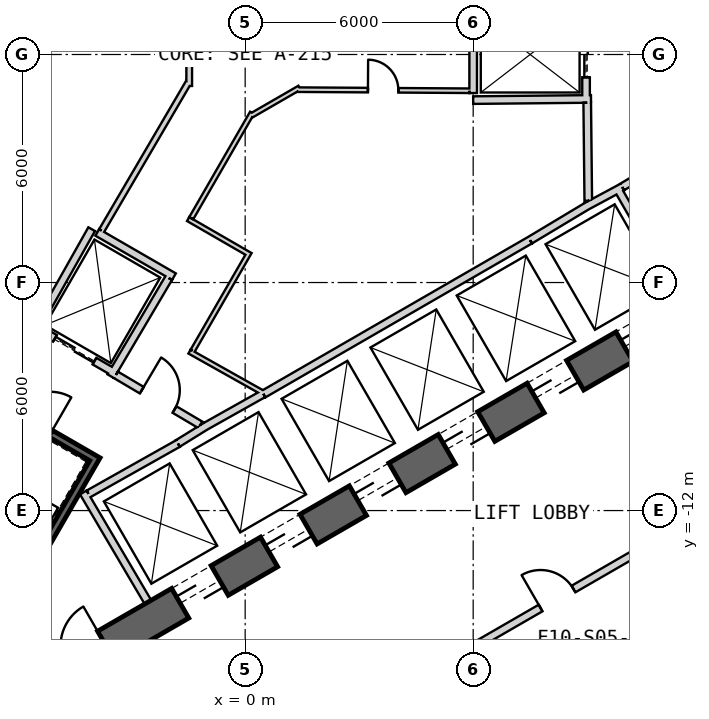
"""IFC4 building model, lengths in metres.
Left out: names, types, materials, properties, quantities, classifications, styles, units other than length and angle.
Written with IfcOpenShell. Run it as: python <this file> out.ifc"""

import sys

from ifc_helpers import new_model, si_unit, direction, frame, frame_2d, origin, place, context, subcontext, project, spatial, rectangle, extrude, element, fill, save


model = new_model("IFC4")
c1 = context("Model", 3, precision=1e-05, world=origin(), true_north=direction((0.0, 1.0)))
c2 = subcontext(c1, "Body", "Model", "MODEL_VIEW")
j1 = project(units=[si_unit("LENGTHUNIT", "METRE"), si_unit("PLANEANGLEUNIT", "RADIAN")], contexts=[c1])
p1 = place(None, origin())
s1 = spatial("IfcSite", under=j1, at=p1, CompositionType="ELEMENT")
p2 = place(p1, origin())
s2 = spatial("IfcBuilding", under=s1, at=p2, CompositionType="ELEMENT")
p3 = place(p2, frame((0.0, 0.0, 107.0)))
s3 = spatial("IfcBuildingStorey", under=s2, at=p3, CompositionType="ELEMENT", Elevation=107.0)
p4 = place(p3, frame((-7.825, -17.97, 0.0), z_axis=(0.0, 0.0, 1.0), x_axis=(0.866028369851, 0.499994862586, 0.0)))
e1 = element("IfcWall", 1, at=p4, inside=s3, PredefinedType="SHEAR", context=c2, shape_type="SweptSolid", body=[
    extrude(rectangle(XDim=31.523, YDim=0.9, at=frame_2d((15.762, 0.0))), origin(), (0.0, 0.0, 1.0), 4.1),
])
p5 = place(p4, frame((7.062, 0.0, 0.0)))
e2 = element("IfcOpeningElement", 2, at=p5, cuts=e1, PredefinedType="OPENING", context=c2, shape_type="SweptSolid", body=[
    extrude(rectangle(XDim=1.2, YDim=2.4, at=frame_2d((0.6, 1.2))), frame((0.0, 0.46, 0.0), z_axis=(0.0, -1.0, 0.0), x_axis=(1.0, 0.0, 0.0)), (0.0, 0.0, 1.0), 0.92),
])
p6 = place(p4, frame((9.762, 0.0, 0.0)))
e3 = element("IfcOpeningElement", 3, at=p6, cuts=e1, PredefinedType="OPENING", context=c2, shape_type="SweptSolid", body=[
    extrude(rectangle(XDim=1.2, YDim=2.4, at=frame_2d((0.6, 1.2))), frame((0.0, 0.46, 0.0), z_axis=(0.0, -1.0, 0.0), x_axis=(1.0, 0.0, 0.0)), (0.0, 0.0, 1.0), 0.92),
])
p7 = place(p4, frame((12.462, 0.0, 0.0)))
e4 = element("IfcOpeningElement", 4, at=p7, cuts=e1, PredefinedType="OPENING", context=c2, shape_type="SweptSolid", body=[
    extrude(rectangle(XDim=1.2, YDim=2.4, at=frame_2d((0.6, 1.2))), frame((0.0, 0.46, 0.0), z_axis=(0.0, -1.0, 0.0), x_axis=(1.0, 0.0, 0.0)), (0.0, 0.0, 1.0), 0.92),
])
p8 = place(p4, frame((15.162, 0.0, 0.0)))
e5 = element("IfcOpeningElement", 5, at=p8, cuts=e1, PredefinedType="OPENING", context=c2, shape_type="SweptSolid", body=[
    extrude(rectangle(XDim=1.2, YDim=2.4, at=frame_2d((0.6, 1.2))), frame((0.0, 0.46, 0.0), z_axis=(0.0, -1.0, 0.0), x_axis=(1.0, 0.0, 0.0)), (0.0, 0.0, 1.0), 0.92),
])
p9 = place(p4, frame((17.862, 0.0, 0.0)))
e6 = element("IfcOpeningElement", 6, at=p9, cuts=e1, PredefinedType="OPENING", context=c2, shape_type="SweptSolid", body=[
    extrude(rectangle(XDim=1.2, YDim=2.4, at=frame_2d((0.6, 1.2))), frame((0.0, 0.46, 0.0), z_axis=(0.0, -1.0, 0.0), x_axis=(1.0, 0.0, 0.0)), (0.0, 0.0, 1.0), 0.92),
])
p10 = place(p4, frame((20.562, 0.0, 0.0)))
e7 = element("IfcOpeningElement", 7, at=p10, cuts=e1, PredefinedType="OPENING", context=c2, shape_type="SweptSolid", body=[
    extrude(rectangle(XDim=1.2, YDim=2.4, at=frame_2d((0.6, 1.2))), frame((0.0, 0.46, 0.0), z_axis=(0.0, -1.0, 0.0), x_axis=(1.0, 0.0, 0.0)), (0.0, 0.0, 1.0), 0.92),
])
p11 = place(p4, frame((26.712, 0.0, 0.0)))
e8 = element("IfcOpeningElement", 8, at=p11, cuts=e1, PredefinedType="OPENING", context=c2, shape_type="SweptSolid", body=[
    extrude(rectangle(XDim=1.2, YDim=2.4, at=frame_2d((0.6, 1.2))), frame((0.0, 0.46, 0.0), z_axis=(0.0, -1.0, 0.0), x_axis=(1.0, 0.0, 0.0)), (0.0, 0.0, 1.0), 0.92),
])
p12 = place(p4, frame((3.612, 0.0, 0.0)))
e9 = element("IfcOpeningElement", 9, at=p12, cuts=e1, PredefinedType="OPENING", context=c2, shape_type="SweptSolid", body=[
    extrude(rectangle(XDim=1.2, YDim=2.4, at=frame_2d((0.6, 1.2))), frame((0.0, 0.46, 0.0), z_axis=(0.0, -1.0, 0.0), x_axis=(1.0, 0.0, 0.0)), (0.0, 0.0, 1.0), 0.92),
])
p13 = place(p3, frame((0.483, -8.936, 0.0), z_axis=(0.0, 0.0, 1.0), x_axis=(0.866030989016, 0.499990325971, 0.0)))
e10 = element("IfcWall", 10, at=p13, inside=s3, PredefinedType="PLUMBINGWALL", context=c2, shape_type="SweptSolid", body=[
    extrude(rectangle(XDim=8.1, YDim=0.2, at=frame_2d((4.05, 0.0))), origin(), (0.0, 0.0, 1.0), 3.8),
])
p14 = place(p3, frame((9.795, -3.525, 0.0), z_axis=(0.0, 0.0, 1.0), x_axis=(0.499984717929, -0.866034226713, 0.0)))
e11 = element("IfcWall", 11, at=p14, inside=s3, PredefinedType="PLUMBINGWALL", context=c2, shape_type="SweptSolid", body=[
    extrude(rectangle(XDim=3.25, YDim=0.2, at=frame_2d((1.625, 0.0))), origin(), (0.0, 0.0, 1.0), 3.8),
])
p15 = place(p3, frame((8.974, -3.999, 0.0), z_axis=(0.0, 0.0, 1.0), x_axis=(0.880907015104, 0.473289373154, 0.0)))
e12 = element("IfcWall", 12, at=p15, inside=s3, PredefinedType="PLUMBINGWALL", context=c2, shape_type="SweptSolid", body=[
    extrude(rectangle(XDim=1.078, YDim=0.2, at=frame_2d((0.539, 0.0))), origin(), (0.0, 0.0, 1.0), 3.8),
])
p16 = place(p3, frame((7.497, -4.886, 0.0), z_axis=(0.0, 0.0, 1.0), x_axis=(0.857516281273, 0.51445682749, 0.0)))
e13 = element("IfcWall", 13, at=p16, inside=s3, PredefinedType="PLUMBINGWALL", context=c2, shape_type="SweptSolid", body=[
    extrude(rectangle(XDim=1.845, YDim=0.2, at=frame_2d((0.922, 0.0))), origin(), (0.0, 0.0, 1.0), 3.8),
])
p17 = place(p3, frame((-2.558, -14.409, 0.0), z_axis=(0.0, 0.0, 1.0), x_axis=(-0.507997497166, 0.861358544901, 0.0)))
e14 = element("IfcWall", 14, at=p17, inside=s3, PredefinedType="PLUMBINGWALL", context=c2, shape_type="SweptSolid", body=[
    extrude(rectangle(XDim=3.35, YDim=0.2, at=frame_2d((1.675, 0.0))), origin(), (0.0, 0.0, 1.0), 3.8),
])
p18 = place(p3, frame((-1.769, -10.237, 0.0), z_axis=(0.0, 0.0, 1.0), x_axis=(-0.871534483978, -0.490334215854, 0.0)))
e15 = element("IfcWall", 15, at=p18, inside=s3, PredefinedType="PLUMBINGWALL", context=c2, shape_type="SweptSolid", body=[
    extrude(rectangle(XDim=2.7, YDim=0.2, at=frame_2d((1.35, 0.0))), origin(), (0.0, 0.0, 1.0), 3.8),
])
p19 = place(p3, frame((-1.024, -9.771, 0.0), z_axis=(0.0, 0.0, 1.0), x_axis=(-0.850348075135, -0.526220629693, 0.0)))
e16 = element("IfcWall", 16, at=p19, inside=s3, PredefinedType="PLUMBINGWALL", context=c2, shape_type="SweptSolid", body=[
    extrude(rectangle(XDim=0.878, YDim=0.2, at=frame_2d((0.439, 0.0))), origin(), (0.0, 0.0, 1.0), 3.8),
])
p20 = place(p3, frame((-1.13, -9.832, 0.0), z_axis=(0.0, 0.0, 1.0), x_axis=(0.871988740738, 0.489525929882, 0.0)))
e17 = element("IfcWall", 17, at=p20, inside=s3, PredefinedType="PLUMBINGWALL", context=c2, shape_type="SweptSolid", body=[
    extrude(rectangle(XDim=1.845, YDim=0.2, at=frame_2d((0.922, 0.0))), origin(), (0.0, 0.0, 1.0), 3.8),
])
p21 = place(p3, frame((8.97, 1.2, 0.0), z_axis=(0.0, 0.0, 1.0), x_axis=(0.0, -1.0, 0.0)))
e18 = element("IfcWall", 18, at=p21, inside=s3, PredefinedType="PLUMBINGWALL", context=c2, shape_type="SweptSolid", body=[
    extrude(rectangle(XDim=2.4, YDim=0.2, at=frame_2d((1.2, 0.0))), origin(), (0.0, 0.0, 1.0), 3.8),
])
p22 = place(p21, frame((0.6, 0.0, 0.0)))
e19 = element("IfcOpeningElement", 19, at=p22, cuts=e18, PredefinedType="OPENING", context=c2, shape_type="SweptSolid", body=[
    extrude(rectangle(XDim=1.2, YDim=2.4, at=frame_2d((0.6, 1.2))), frame((0.0, 0.11, 0.0), z_axis=(0.0, -1.0, 0.0), x_axis=(1.0, 0.0, 0.0)), (0.0, 0.0, 1.0), 0.22),
])
p23 = place(p3, frame((9.1, -1.169, 0.0), z_axis=(0.0, 0.0, 1.0), x_axis=(-0.999949988, -0.010001074852, 0.0)))
e20 = element("IfcWall", 20, at=p23, inside=s3, PredefinedType="PLUMBINGWALL", context=c2, shape_type="SweptSolid", body=[
    extrude(rectangle(XDim=3.1, YDim=0.2, at=frame_2d((1.55, 0.0))), origin(), (0.0, 0.0, 1.0), 3.8),
])
p24 = place(p3, frame((6.0, -1.014, 0.0), z_axis=(0.0, 0.0, 1.0), x_axis=(0.0, 1.0, 0.0)))
e21 = element("IfcWall", 21, at=p24, inside=s3, PredefinedType="PLUMBINGWALL", context=c2, shape_type="SweptSolid", body=[
    extrude(rectangle(XDim=2.314, YDim=0.2, at=frame_2d((1.157, 0.0))), origin(), (0.0, 0.0, 1.0), 3.8),
])
p25 = place(p3, frame((-3.905, -10.563, -0.3), z_axis=(0.0, 0.0, 1.0), x_axis=(-0.500012932018, -0.866017937352, 0.0)))
e22 = element("IfcWall", 22, at=p25, inside=s3, PredefinedType="SHEAR", context=c2, shape_type="SweptSolid", body=[
    extrude(rectangle(XDim=8.1, YDim=0.2, at=frame_2d((4.05, 0.0))), origin(), (0.0, 0.0, 1.0), 4.1),
])
p26 = place(p3, frame((-4.041, -10.599, -0.3), z_axis=(0.0, 0.0, 1.0), x_axis=(-0.866047807691, 0.499961193289, 0.0)))
e23 = element("IfcWall", 23, at=p26, inside=s3, PredefinedType="SHEAR", context=c2, shape_type="SweptSolid", body=[
    extrude(rectangle(XDim=3.6, YDim=0.2, at=frame_2d((1.8, 0.0))), origin(), (0.0, 0.0, 1.0), 4.1),
])
p27 = place(p26, frame((1.25, 0.0, 0.3)))
e24 = element("IfcOpeningElement", 24, at=p27, cuts=e23, PredefinedType="OPENING", context=c2, shape_type="SweptSolid", body=[
    extrude(rectangle(XDim=1.1, YDim=2.1, at=frame_2d((0.55, 1.05))), frame((0.0, 0.11, 0.0), z_axis=(0.0, -1.0, 0.0), x_axis=(1.0, 0.0, 0.0)), (0.0, 0.0, 1.0), 0.22),
])
p28 = place(p3, frame((-3.446, -8.368, 0.0), z_axis=(0.0, 0.0, 1.0), x_axis=(-0.866024647952, 0.500001309137, 0.0)))
e25 = element("IfcWall", 25, at=p28, inside=s3, PredefinedType="PLUMBINGWALL", context=c2, shape_type="SweptSolid", body=[
    extrude(rectangle(XDim=2.4, YDim=0.2, at=frame_2d((1.2, 0.0))), origin(), (0.0, 0.0, 1.0), 3.8),
])
p29 = place(p28, frame((0.6, 0.0, 0.0)))
e26 = element("IfcOpeningElement", 26, at=p29, cuts=e25, PredefinedType="OPENING", context=c2, shape_type="SweptSolid", body=[
    extrude(rectangle(XDim=1.2, YDim=2.4, at=frame_2d((0.6, 1.2))), frame((0.0, 0.11, 0.0), z_axis=(0.0, -1.0, 0.0), x_axis=(1.0, 0.0, 0.0)), (0.0, 0.0, 1.0), 0.22),
])
p30 = place(p3, frame((-5.562, -7.296, 0.0), z_axis=(0.0, 0.0, 1.0), x_axis=(0.491322718731, 0.870977603649, 0.0)))
e27 = element("IfcWall", 27, at=p30, inside=s3, PredefinedType="PLUMBINGWALL", context=c2, shape_type="SweptSolid", body=[
    extrude(rectangle(XDim=3.1, YDim=0.2, at=frame_2d((1.55, 0.0))), origin(), (0.0, 0.0, 1.0), 3.8),
])
p31 = place(p3, frame((-3.892, -4.681, 0.0), z_axis=(0.0, 0.0, 1.0), x_axis=(0.866009305107, -0.50002788269, 0.0)))
e28 = element("IfcWall", 28, at=p31, inside=s3, PredefinedType="PLUMBINGWALL", context=c2, shape_type="SweptSolid", body=[
    extrude(rectangle(XDim=2.329, YDim=0.2, at=frame_2d((1.165, 0.0))), origin(), (0.0, 0.0, 1.0), 3.8),
])
p32 = place(p3, frame((-2.012, -5.882, 0.0), z_axis=(0.0, 0.0, 1.0), x_axis=(-0.508619639323, -0.860991325447, 0.0)))
e29 = element("IfcWall", 29, at=p32, inside=s3, PredefinedType="PLUMBINGWALL", context=c2, shape_type="SweptSolid", body=[
    extrude(rectangle(XDim=3.0, YDim=0.2, at=frame_2d((1.5, 0.0))), origin(), (0.0, 0.0, 1.0), 3.8),
])
p33 = place(p3, frame((12.245, -2.109, 0.0), z_axis=(0.0, 0.0, 1.0), x_axis=(-0.860414880418, -0.509594185166, 0.0)))
e30 = element("IfcWall", 30, at=p33, inside=s3, PredefinedType="PARTITIONING", context=c2, shape_type="SweptSolid", body=[
    extrude(rectangle(XDim=2.7, YDim=0.2, at=frame_2d((1.35, 0.0))), origin(), (0.0, 0.0, 1.0), 3.8),
])
p34 = place(p3, frame((9.029, -3.851, 0.0), z_axis=(0.0, 0.0, 1.0), x_axis=(-0.010784614026, 0.999941844359, 0.0)))
e31 = element("IfcWall", 31, at=p34, inside=s3, PredefinedType="PARTITIONING", context=c2, shape_type="SweptSolid", body=[
    extrude(rectangle(XDim=2.581, YDim=0.2, at=frame_2d((1.291, 0.0))), origin(), (0.0, 0.0, 1.0), 3.8),
])
p35 = place(p3, frame((-3.401, -8.43, 0.0), z_axis=(0.0, 0.0, 1.0), x_axis=(0.860598681535, -0.509283721849, 0.0)))
e32 = element("IfcWall", 32, at=p35, inside=s3, PredefinedType="PARTITIONING", context=c2, shape_type="SweptSolid", body=[
    extrude(rectangle(XDim=2.581, YDim=0.2, at=frame_2d((1.291, 0.0))), origin(), (0.0, 0.0, 1.0), 3.8),
])
p36 = place(p35, frame((0.791, 0.0, 0.0)))
e33 = element("IfcOpeningElement", 33, at=p36, cuts=e32, PredefinedType="OPENING", context=c2, shape_type="SweptSolid", body=[
    extrude(rectangle(XDim=1.0, YDim=2.1, at=frame_2d((0.5, 1.05))), frame((0.0, 0.11, 0.0), z_axis=(0.0, -1.0, 0.0), x_axis=(1.0, 0.0, 0.0)), (0.0, 0.0, 1.0), 0.22),
])
p37 = place(p3, frame((-1.472, -0.828, 0.0), z_axis=(0.0, 0.0, 1.0), x_axis=(0.0, 1.0, 0.0)))
e34 = element("IfcWall", 34, at=p37, inside=s3, PredefinedType="PLUMBINGWALL", context=c2, shape_type="SweptSolid", body=[
    extrude(rectangle(XDim=1.505, YDim=0.15, at=frame_2d((0.752, 0.0))), origin(), (0.0, 0.0, 1.0), 3.8),
])
p38 = place(p3, frame((-3.776, -4.633, 0.0), z_axis=(0.0, 0.0, 1.0), x_axis=(0.505503910315, 0.8628243139, 0.0)))
e35 = element("IfcWall", 35, at=p38, inside=s3, PredefinedType="PLUMBINGWALL", context=c2, shape_type="SweptSolid", body=[
    extrude(rectangle(XDim=4.534, YDim=0.15, at=frame_2d((2.267, 0.0))), origin(), (0.0, 0.0, 1.0), 3.8),
])
p39 = place(p3, frame((-1.464, -7.816, 0.0), z_axis=(0.0, 0.0, 1.0), x_axis=(0.871880202732, -0.489719217597, 0.0)))
e36 = element("IfcWall", 36, at=p39, inside=s3, PredefinedType="PARTITIONING", context=c2, shape_type="SweptSolid", body=[
    extrude(rectangle(XDim=2.224, YDim=0.12, at=frame_2d((1.112, 0.0))), origin(), (0.0, 0.0, 1.0), 3.8),
])
p40 = place(p3, frame((0.118, -5.195, 0.0), z_axis=(0.0, 0.0, 1.0), x_axis=(-0.499990139034, -0.866031096941, 0.0)))
e37 = element("IfcWall", 37, at=p40, inside=s3, PredefinedType="PARTITIONING", context=c2, shape_type="SweptSolid", body=[
    extrude(rectangle(XDim=3.0, YDim=0.12, at=frame_2d((1.5, 0.0))), origin(), (0.0, 0.0, 1.0), 3.8),
])
p41 = place(p3, frame((-1.501, -4.33, 0.0), z_axis=(0.0, 0.0, 1.0), x_axis=(0.866059624469, -0.499940723351, 0.0)))
e38 = element("IfcWall", 38, at=p41, inside=s3, PredefinedType="PARTITIONING", context=c2, shape_type="SweptSolid", body=[
    extrude(rectangle(XDim=1.775, YDim=0.12, at=frame_2d((0.888, 0.0))), origin(), (0.0, 0.0, 1.0), 3.8),
])
p42 = place(p3, frame((0.182, -1.535, 0.0), z_axis=(0.0, 0.0, 1.0), x_axis=(-0.500001886891, -0.866024314385, 0.0)))
e39 = element("IfcWall", 39, at=p42, inside=s3, PredefinedType="PARTITIONING", context=c2, shape_type="SweptSolid", body=[
    extrude(rectangle(XDim=3.202, YDim=0.12, at=frame_2d((1.601, 0.0))), origin(), (0.0, 0.0, 1.0), 3.8),
])
p43 = place(p3, frame((1.431, -0.874, 0.0), z_axis=(0.0, 0.0, 1.0), x_axis=(-0.866037643702, -0.499978799242, 0.0)))
e40 = element("IfcWall", 40, at=p43, inside=s3, PredefinedType="PARTITIONING", context=c2, shape_type="SweptSolid", body=[
    extrude(rectangle(XDim=1.484, YDim=0.12, at=frame_2d((0.742, 0.0))), origin(), (0.0, 0.0, 1.0), 3.8),
])
p44 = place(p3, frame((5.9, -0.954, 0.0), z_axis=(0.0, 0.0, 1.0), x_axis=(-0.999979855239, 0.006347370786, 0.0)))
e41 = element("IfcWall", 41, at=p44, inside=s3, PredefinedType="PARTITIONING", context=c2, shape_type="SweptSolid", body=[
    extrude(rectangle(XDim=4.539, YDim=0.12, at=frame_2d((2.269, 0.0))), origin(), (0.0, 0.0, 1.0), 3.8),
])
p45 = place(p44, frame((1.869, 0.0, 0.0)))
e42 = element("IfcOpeningElement", 42, at=p45, cuts=e41, PredefinedType="OPENING", context=c2, shape_type="SweptSolid", body=[
    extrude(rectangle(XDim=0.8, YDim=2.1, at=frame_2d((0.4, 1.05))), frame((0.0, 0.07, 0.0), z_axis=(0.0, -1.0, 0.0), x_axis=(1.0, 0.0, 0.0)), (0.0, 0.0, 1.0), 0.14),
])
p46 = place(p3, frame((-6.227, -22.648, 0.0), z_axis=(0.0, 0.0, 1.0), x_axis=(0.866024349396, 0.50000182625, 0.0)))
e43 = element("IfcWall", 43, at=p46, inside=s3, PredefinedType="PARTITIONING", context=c2, shape_type="SweptSolid", body=[
    extrude(rectangle(XDim=33.234, YDim=0.2, at=frame_2d((16.617, 0.0))), origin(), (0.0, 0.0, 1.0), 2.98),
])
p47 = place(p46, frame((16.167, 0.0, 0.0)))
e44 = element("IfcOpeningElement", 44, at=p47, cuts=e43, PredefinedType="OPENING", context=c2, shape_type="SweptSolid", body=[
    extrude(rectangle(XDim=1.0, YDim=2.1, at=frame_2d((0.5, 1.05))), frame((0.0, 0.11, 0.0), z_axis=(0.0, -1.0, 0.0), x_axis=(1.0, 0.0, 0.0)), (0.0, 0.0, 1.0), 0.22),
])
p48 = place(p22, origin())
e45 = element("IfcDoor", 45, at=p48, inside=s3, OperationType="SLIDING_TO_LEFT", PredefinedType="USERDEFINED", context=c2, shape_type="SweptSolid", body=[
    extrude(rectangle(XDim=1.2, YDim=2.4, at=frame_2d((0.6, 1.2))), frame((0.0, 0.025, 0.0), z_axis=(0.0, -1.0, 0.0), x_axis=(1.0, 0.0, 0.0)), (0.0, 0.0, 1.0), 0.05),
])
fill(e19, e45)
p49 = place(p36, origin())
e46 = element("IfcDoor", 46, at=p49, inside=s3, OperationType="SINGLE_SWING_LEFT", PredefinedType="USERDEFINED", context=c2, shape_type="SweptSolid", body=[
    extrude(rectangle(XDim=1.0, YDim=2.1, at=frame_2d((0.5, 1.05))), frame((0.0, 0.025, 0.0), z_axis=(0.0, -1.0, 0.0), x_axis=(1.0, 0.0, 0.0)), (0.0, 0.0, 1.0), 0.05),
])
fill(e33, e46)
p50 = place(p29, origin())
e47 = element("IfcDoor", 47, at=p50, inside=s3, OperationType="SLIDING_TO_LEFT", PredefinedType="USERDEFINED", context=c2, shape_type="SweptSolid", body=[
    extrude(rectangle(XDim=1.2, YDim=2.4, at=frame_2d((0.6, 1.2))), frame((0.0, 0.025, 0.0), z_axis=(0.0, -1.0, 0.0), x_axis=(1.0, 0.0, 0.0)), (0.0, 0.0, 1.0), 0.05),
])
fill(e26, e47)
p51 = place(p45, origin())
e48 = element("IfcDoor", 48, at=p51, inside=s3, OperationType="SINGLE_SWING_LEFT", PredefinedType="USERDEFINED", context=c2, shape_type="SweptSolid", body=[
    extrude(rectangle(XDim=0.8, YDim=2.1, at=frame_2d((0.4, 1.05))), frame((0.0, 0.025, 0.0), z_axis=(0.0, -1.0, 0.0), x_axis=(1.0, 0.0, 0.0)), (0.0, 0.0, 1.0), 0.05),
])
fill(e42, e48)
p52 = place(p47, origin())
e49 = element("IfcDoor", 49, at=p52, inside=s3, OperationType="SINGLE_SWING_LEFT", PredefinedType="USERDEFINED", context=c2, shape_type="SweptSolid", body=[
    extrude(rectangle(XDim=1.0, YDim=2.1, at=frame_2d((0.5, 1.05))), frame((0.0, 0.025, 0.0), z_axis=(0.0, -1.0, 0.0), x_axis=(1.0, 0.0, 0.0)), (0.0, 0.0, 1.0), 0.05),
])
fill(e44, e49)
p53 = place(p5, origin())
e50 = element("IfcDoor", 50, at=p53, inside=s3, OperationType="SLIDING_TO_LEFT", PredefinedType="USERDEFINED", context=c2, shape_type="SweptSolid", body=[
    extrude(rectangle(XDim=1.2, YDim=2.4, at=frame_2d((0.6, 1.2))), frame((0.0, 0.025, 0.0), z_axis=(0.0, -1.0, 0.0), x_axis=(1.0, 0.0, 0.0)), (0.0, 0.0, 1.0), 0.05),
])
fill(e2, e50)
p54 = place(p6, origin())
e51 = element("IfcDoor", 51, at=p54, inside=s3, OperationType="SLIDING_TO_LEFT", PredefinedType="USERDEFINED", context=c2, shape_type="SweptSolid", body=[
    extrude(rectangle(XDim=1.2, YDim=2.4, at=frame_2d((0.6, 1.2))), frame((0.0, 0.025, 0.0), z_axis=(0.0, -1.0, 0.0), x_axis=(1.0, 0.0, 0.0)), (0.0, 0.0, 1.0), 0.05),
])
fill(e3, e51)
p55 = place(p7, origin())
e52 = element("IfcDoor", 52, at=p55, inside=s3, OperationType="SLIDING_TO_LEFT", PredefinedType="USERDEFINED", context=c2, shape_type="SweptSolid", body=[
    extrude(rectangle(XDim=1.2, YDim=2.4, at=frame_2d((0.6, 1.2))), frame((0.0, 0.025, 0.0), z_axis=(0.0, -1.0, 0.0), x_axis=(1.0, 0.0, 0.0)), (0.0, 0.0, 1.0), 0.05),
])
fill(e4, e52)
p56 = place(p8, origin())
e53 = element("IfcDoor", 53, at=p56, inside=s3, OperationType="SLIDING_TO_LEFT", PredefinedType="USERDEFINED", context=c2, shape_type="SweptSolid", body=[
    extrude(rectangle(XDim=1.2, YDim=2.4, at=frame_2d((0.6, 1.2))), frame((0.0, 0.025, 0.0), z_axis=(0.0, -1.0, 0.0), x_axis=(1.0, 0.0, 0.0)), (0.0, 0.0, 1.0), 0.05),
])
fill(e5, e53)
p57 = place(p9, origin())
e54 = element("IfcDoor", 54, at=p57, inside=s3, OperationType="SLIDING_TO_LEFT", PredefinedType="USERDEFINED", context=c2, shape_type="SweptSolid", body=[
    extrude(rectangle(XDim=1.2, YDim=2.4, at=frame_2d((0.6, 1.2))), frame((0.0, 0.025, 0.0), z_axis=(0.0, -1.0, 0.0), x_axis=(1.0, 0.0, 0.0)), (0.0, 0.0, 1.0), 0.05),
])
fill(e6, e54)
p58 = place(p10, origin())
e55 = element("IfcDoor", 55, at=p58, inside=s3, OperationType="SLIDING_TO_LEFT", PredefinedType="USERDEFINED", context=c2, shape_type="SweptSolid", body=[
    extrude(rectangle(XDim=1.2, YDim=2.4, at=frame_2d((0.6, 1.2))), frame((0.0, 0.025, 0.0), z_axis=(0.0, -1.0, 0.0), x_axis=(1.0, 0.0, 0.0)), (0.0, 0.0, 1.0), 0.05),
])
fill(e7, e55)
save(model, sys.argv[1])
